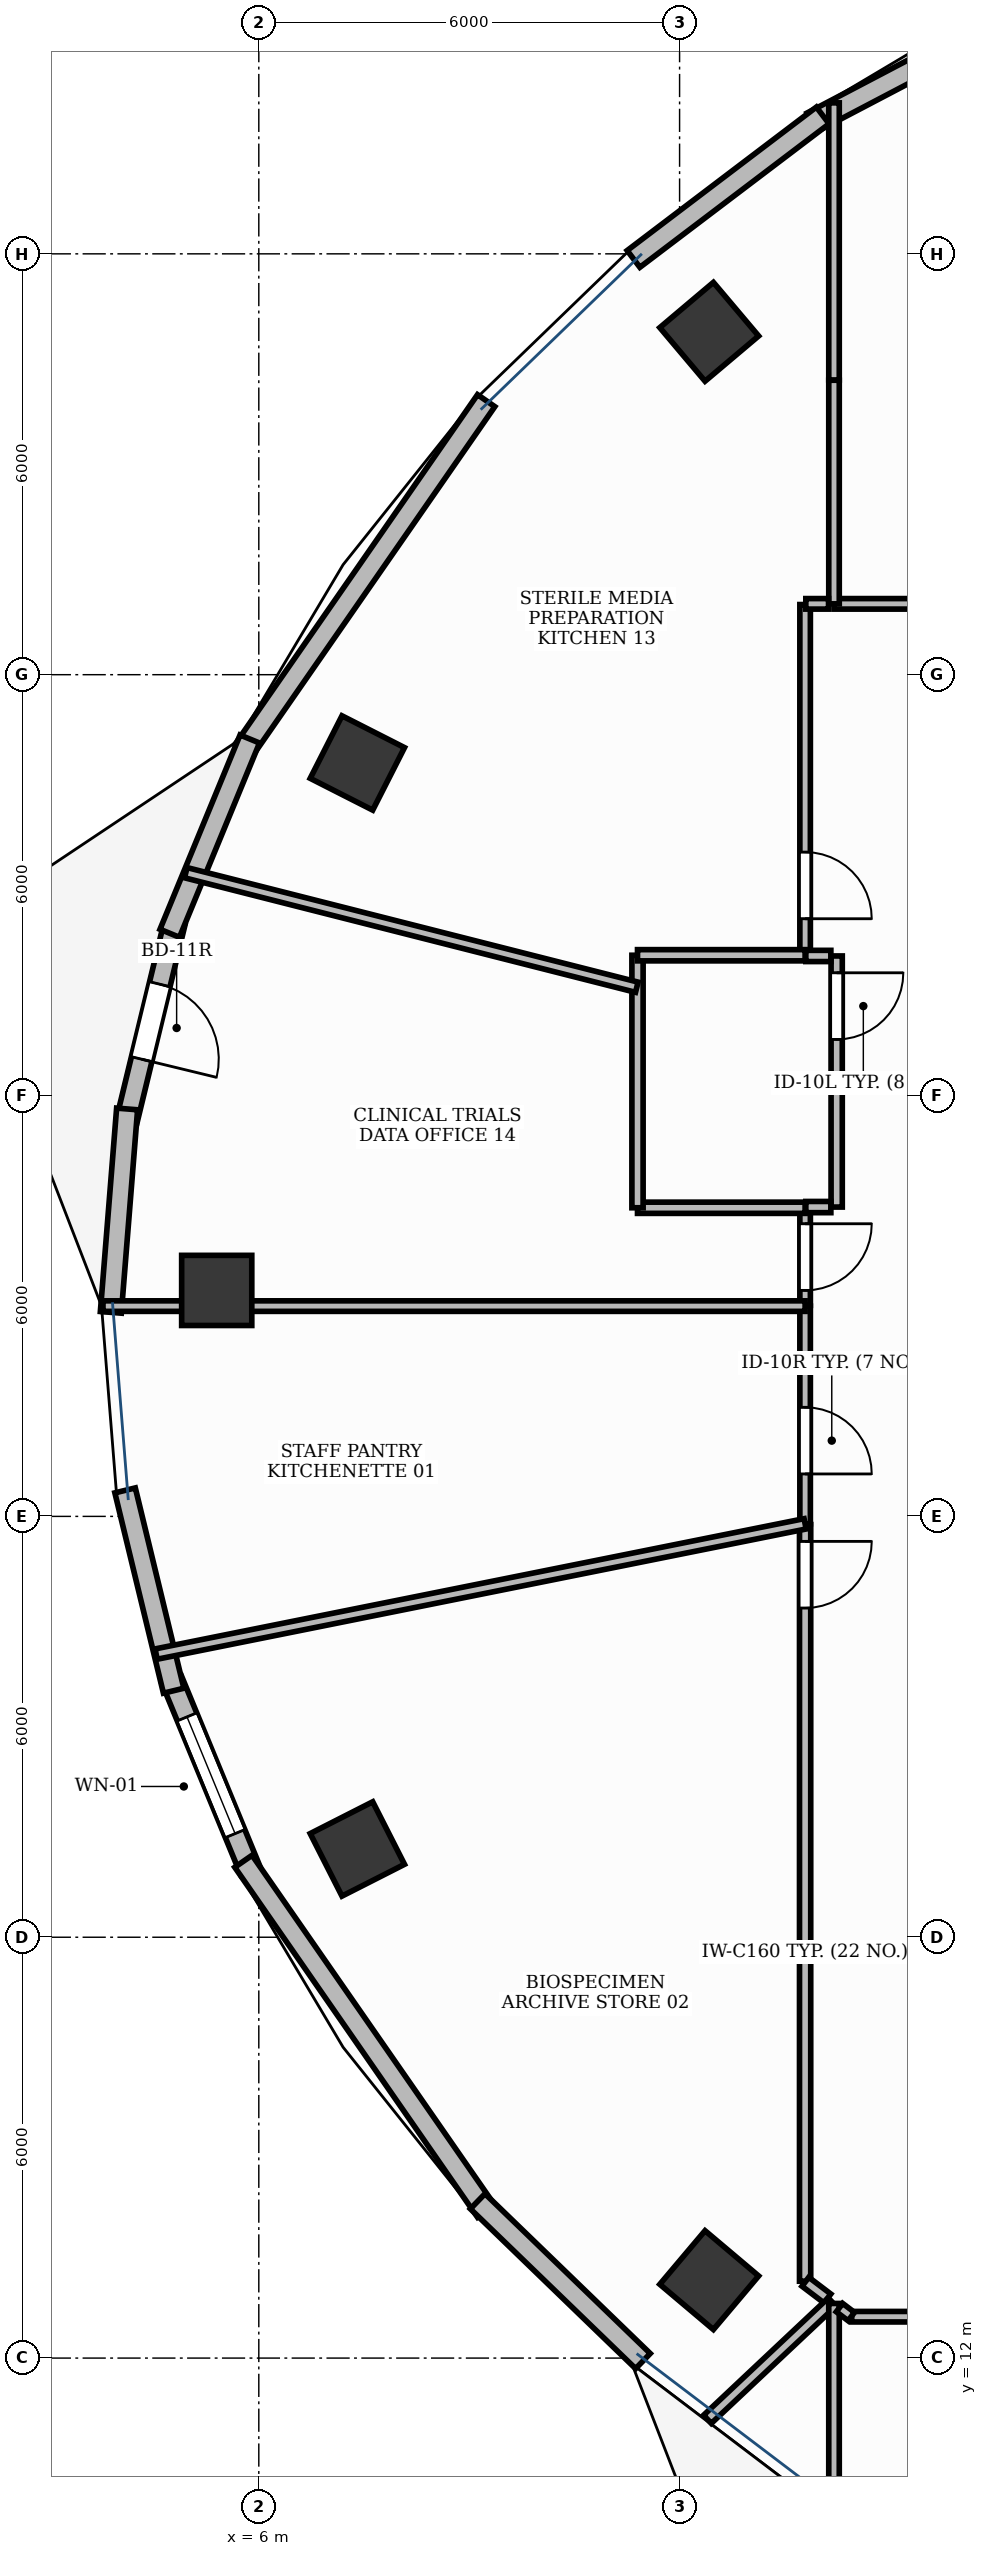
"""IFC4 building model, lengths in metres.
Left out: names, types, materials, properties, quantities, classifications, styles, units other than length and angle.
Written with IfcOpenShell. Run it as: python <this file> out.ifc"""

import sys

from ifc_helpers import new_model, si_unit, direction, frame, frame_2d, origin, origin_2d, place, context, subcontext, project, spatial, rectangle, extrude, element, fill, save


model = new_model("IFC4")
c1 = context("Model", 3, precision=1e-05, world=origin(), true_north=direction((0.0, 1.0)))
c2 = subcontext(c1, "Body", "Model", "MODEL_VIEW")
j1 = project(units=[si_unit("LENGTHUNIT", "METRE"), si_unit("PLANEANGLEUNIT", "RADIAN")], contexts=[c1])
p1 = place(None, origin())
s1 = spatial("IfcSite", under=j1, at=p1, CompositionType="ELEMENT")
p2 = place(p1, origin())
s2 = spatial("IfcBuilding", under=s1, at=p2, CompositionType="ELEMENT")
p3 = place(p2, frame((0.0, 0.0, 239.4)))
s3 = spatial("IfcBuildingStorey", under=s2, at=p3, CompositionType="ELEMENT", Elevation=239.4)
for number, where, z_axis, x_axis in (
    (1, (12.423, 40.889, -0.0), (0.0, 0.0, 1.0), (0.764, 0.645, 0.0)),
    (2, (7.405, 34.741, -0.0), (0.0, 0.0, 1.0), (0.453, 0.891, 0.0)),
    (3, (5.4, 27.222, -0.0), (0.0, 0.0, 1.0), (0.0, 1.0, 0.0)),
    (4, (7.405, 19.259, -0.0), (0.0, 0.0, 1.0), (-0.453, 0.891, 0.0)),
    (5, (12.423, 13.111, -0.0), (0.0, 0.0, 1.0), (-0.764, 0.645, 0.0)),
):
    element("IfcColumn", number, at=place(p3, frame(where, z_axis=z_axis, x_axis=x_axis)), inside=s3, PredefinedType="COLUMN", context=c2, shape_type="SweptSolid", body=[
        extrude(rectangle(XDim=1.0, YDim=1.0, at=origin_2d()), origin(), (0.0, 0.0, 1.0), 3.901),
    ])
p4 = place(p3, frame((4.8, 32.461, 0.0), z_axis=(0.0, 0.0, 1.0), x_axis=(-0.23549395731, -0.971875813091, 0.0)))
e6 = element("IfcWall", 6, at=p4, inside=s3, PredefinedType="STANDARD", context=c2, shape_type="SweptSolid", body=[
    extrude(rectangle(XDim=2.899, YDim=0.3, at=frame_2d((1.449, 0.0))), origin(), (0.0, 0.0, 1.0), 3.9),
])
p5 = place(p4, frame((0.899, 0.0, 0.0)))
e7 = element("IfcOpeningElement", 7, at=p5, cuts=e6, PredefinedType="OPENING", context=c2, shape_type="SweptSolid", body=[
    extrude(rectangle(XDim=1.1, YDim=2.15, at=frame_2d((0.55, 1.075))), frame((0.0, 0.165, 0.0), z_axis=(0.0, -1.0, 0.0), x_axis=(1.0, 0.0, 0.0)), (0.0, 0.0, 1.0), 0.33),
])
p6 = place(p3, frame((4.756, 21.676, 0.0), z_axis=(0.0, 0.0, 1.0), x_axis=(0.381011504275, -0.924570296738, 0.0)))
e8 = element("IfcWall", 8, at=p6, inside=s3, PredefinedType="STANDARD", context=c2, shape_type="SweptSolid", body=[
    extrude(rectangle(XDim=2.956, YDim=0.3, at=frame_2d((1.478, 0.0))), origin(), (0.0, 0.0, 1.0), 3.9),
])
p7 = place(p6, frame((0.578, 0.0, 0.9)))
e9 = element("IfcOpeningElement", 9, at=p7, cuts=e8, PredefinedType="OPENING", context=c2, shape_type="SweptSolid", body=[
    extrude(rectangle(XDim=1.8, YDim=2.1, at=frame_2d((0.9, 1.05))), frame((0.0, 0.165, 0.0), z_axis=(0.0, -1.0, 0.0), x_axis=(1.0, 0.0, 0.0)), (0.0, 0.0, 1.0), 0.33),
])
p8 = place(p3, frame((20.004, 47.084, 0.0), z_axis=(0.0, 0.0, 1.0), x_axis=(-0.885549132128, -0.464545729274, 0.0)))
e10 = element("IfcWall", 10, at=p8, inside=s3, PredefinedType="STANDARD", context=c2, shape_type="SweptSolid", body=[
    extrude(rectangle(XDim=6.908, YDim=0.3, at=frame_2d((3.454, 0.0))), origin(), (0.0, 0.0, 1.0), 3.9),
])
p9 = place(p3, frame((14.041, 43.973, 0.0), z_axis=(0.0, 0.0, 1.0), x_axis=(-0.796917512891, -0.604088137317, 0.0)))
e11 = element("IfcWall", 11, at=p9, inside=s3, PredefinedType="STANDARD", context=c2, shape_type="SweptSolid", body=[
    extrude(rectangle(XDim=3.385, YDim=0.3, at=frame_2d((1.693, 0.0))), origin(), (0.0, 0.0, 1.0), 3.9),
])
p10 = place(p3, frame((9.242, 39.907, 0.0), z_axis=(0.0, 0.0, 1.0), x_axis=(-0.569941426855, -0.821685322952, 0.0)))
e12 = element("IfcWall", 12, at=p10, inside=s3, PredefinedType="STANDARD", context=c2, shape_type="SweptSolid", body=[
    extrude(rectangle(XDim=6.073, YDim=0.3, at=frame_2d((3.036, 0.0))), origin(), (0.0, 0.0, 1.0), 3.9),
])
p11 = place(p3, frame((5.871, 35.083, 0.0), z_axis=(0.0, 0.0, 1.0), x_axis=(-0.380967021775, -0.924588626536, 0.0)))
e13 = element("IfcWall", 13, at=p11, inside=s3, PredefinedType="STANDARD", context=c2, shape_type="SweptSolid", body=[
    extrude(rectangle(XDim=2.996, YDim=0.3, at=frame_2d((1.498, 0.0))), origin(), (0.0, 0.0, 1.0), 3.9),
])
p12 = place(p3, frame((4.122, 29.809, 0.0), z_axis=(0.0, 0.0, 1.0), x_axis=(-0.079738550157, -0.996815812284, 0.0)))
e14 = element("IfcWall", 14, at=p12, inside=s3, PredefinedType="STANDARD", context=c2, shape_type="SweptSolid", body=[
    extrude(rectangle(XDim=2.909, YDim=0.3, at=frame_2d((1.454, 0.0))), origin(), (0.0, 0.0, 1.0), 3.9),
])
p13 = place(p3, frame((4.094, 24.371, 0.0), z_axis=(0.0, 0.0, 1.0), x_axis=(0.235531068122, -0.971866820068, 0.0)))
e15 = element("IfcWall", 15, at=p13, inside=s3, PredefinedType="STANDARD", context=c2, shape_type="SweptSolid", body=[
    extrude(rectangle(XDim=2.939, YDim=0.3, at=frame_2d((1.469, 0.0))), origin(), (0.0, 0.0, 1.0), 3.9),
])
p14 = place(p3, frame((5.781, 19.083, 0.0), z_axis=(0.0, 0.0, 1.0), x_axis=(0.569941426855, -0.821685322952, 0.0)))
e16 = element("IfcWall", 16, at=p14, inside=s3, PredefinedType="STANDARD", context=c2, shape_type="SweptSolid", body=[
    extrude(rectangle(XDim=6.073, YDim=0.3, at=frame_2d((3.036, 0.0))), origin(), (0.0, 0.0, 1.0), 3.9),
])
p15 = place(p3, frame((9.121, 14.235, 0.0), z_axis=(0.0, 0.0, 1.0), x_axis=(0.718999544538, -0.695010543052, 0.0)))
e17 = element("IfcWall", 17, at=p15, inside=s3, PredefinedType="STANDARD", context=c2, shape_type="SweptSolid", body=[
    extrude(rectangle(XDim=3.277, YDim=0.3, at=frame_2d((1.639, 0.0))), origin(), (0.0, 0.0, 1.0), 3.9),
])
p16 = place(p3, frame((14.24, 31.99, 0.0), z_axis=(0.0, 0.0, 1.0), x_axis=(0.0, -1.0, 0.0)))
e18 = element("IfcWall", 18, at=p16, inside=s3, PredefinedType="PARTITIONING", context=c2, shape_type="SweptSolid", body=[
    extrude(rectangle(XDim=3.58, YDim=0.16, at=frame_2d((1.79, 0.0))), origin(), (0.0, 0.0, 1.0), 2.22),
])
p17 = place(p16, frame((0.24, 0.0, 0.0)))
e19 = element("IfcOpeningElement", 19, at=p17, cuts=e18, PredefinedType="OPENING", context=c2, shape_type="SweptSolid", body=[
    extrude(rectangle(XDim=0.95, YDim=2.15, at=frame_2d((0.475, 1.075))), frame((0.0, 0.095, 0.0), z_axis=(0.0, -1.0, 0.0), x_axis=(1.0, 0.0, 0.0)), (0.0, 0.0, 1.0), 0.19),
])
p18 = place(p3, frame((13.79, 26.998, 0.0), z_axis=(0.0, 0.0, 1.0), x_axis=(0.0, -1.0, 0.0)))
e20 = element("IfcWall", 20, at=p18, inside=s3, PredefinedType="PARTITIONING", context=c2, shape_type="SweptSolid", body=[
    extrude(rectangle(XDim=3.104, YDim=0.15, at=frame_2d((1.552, 0.0))), origin(), (0.0, 0.0, 1.0), 2.22),
])
p19 = place(p18, frame((1.443, 0.0, 0.0)))
e21 = element("IfcOpeningElement", 21, at=p19, cuts=e20, PredefinedType="OPENING", context=c2, shape_type="SweptSolid", body=[
    extrude(rectangle(XDim=0.95, YDim=2.15, at=frame_2d((0.475, 1.075))), frame((0.0, 0.09, 0.0), z_axis=(0.0, -1.0, 0.0), x_axis=(1.0, 0.0, 0.0)), (0.0, 0.0, 1.0), 0.18),
])
p20 = place(p3, frame((13.79, 23.884, 0.0), z_axis=(0.0, 0.0, 1.0), x_axis=(0.0, -1.0, 0.0)))
e22 = element("IfcWall", 22, at=p20, inside=s3, PredefinedType="PARTITIONING", context=c2, shape_type="SweptSolid", body=[
    extrude(rectangle(XDim=10.787, YDim=0.16, at=frame_2d((5.394, 0.0))), origin(), (0.0, 0.0, 1.0), 2.22),
])
p21 = place(p20, frame((0.24, 0.0, 0.0)))
e23 = element("IfcOpeningElement", 23, at=p21, cuts=e22, PredefinedType="OPENING", context=c2, shape_type="SweptSolid", body=[
    extrude(rectangle(XDim=0.95, YDim=2.15, at=frame_2d((0.475, 1.075))), frame((0.0, 0.095, 0.0), z_axis=(0.0, -1.0, 0.0), x_axis=(1.0, 0.0, 0.0)), (0.0, 0.0, 1.0), 0.19),
])
p22 = place(p3, frame((14.454, 12.59, 0.0), z_axis=(0.0, 0.0, 1.0), x_axis=(1.0, 0.0, 0.0)))
e24 = element("IfcWall", 24, at=p22, inside=s3, PredefinedType="PARTITIONING", context=c2, shape_type="SweptSolid", body=[
    extrude(rectangle(XDim=12.652, YDim=0.15, at=frame_2d((6.326, 0.0))), origin(), (0.0, 0.0, 1.0), 2.22),
])
p23 = place(p22, frame((1.673, 0.0, 0.0)))
e25 = element("IfcOpeningElement", 25, at=p23, cuts=e24, PredefinedType="OPENING", context=c2, shape_type="SweptSolid", body=[
    extrude(rectangle(XDim=0.95, YDim=2.15, at=frame_2d((0.475, 1.075))), frame((0.0, 0.09, 0.0), z_axis=(0.0, -1.0, 0.0), x_axis=(1.0, 0.0, 0.0)), (0.0, 0.0, 1.0), 0.18),
])
p24 = place(p3, frame((13.79, 37.0, 0.0), z_axis=(0.0, 0.0, 1.0), x_axis=(0.0, -1.0, 0.0)))
e26 = element("IfcWall", 26, at=p24, inside=s3, PredefinedType="PARTITIONING", context=c2, shape_type="SweptSolid", body=[
    extrude(rectangle(XDim=4.99, YDim=0.15, at=frame_2d((2.495, 0.0))), origin(), (0.0, 0.0, 1.0), 2.22),
])
p25 = place(p24, frame((3.529, 0.0, 0.0)))
e27 = element("IfcOpeningElement", 27, at=p25, cuts=e26, PredefinedType="OPENING", context=c2, shape_type="SweptSolid", body=[
    extrude(rectangle(XDim=0.95, YDim=2.15, at=frame_2d((0.475, 1.075))), frame((0.0, 0.09, 0.0), z_axis=(0.0, -1.0, 0.0), x_axis=(1.0, 0.0, 0.0)), (0.0, 0.0, 1.0), 0.18),
])
p26 = place(p3, frame((13.79, 28.39, 0.0), z_axis=(0.0, 0.0, 1.0), x_axis=(0.0, -1.0, 0.0)))
e28 = element("IfcWall", 28, at=p26, inside=s3, PredefinedType="PARTITIONING", context=c2, shape_type="SweptSolid", body=[
    extrude(rectangle(XDim=1.382, YDim=0.15, at=frame_2d((0.691, 0.0))), origin(), (0.0, 0.0, 1.0), 2.22),
])
p27 = place(p26, frame((0.218, 0.0, 0.0)))
e29 = element("IfcOpeningElement", 29, at=p27, cuts=e28, PredefinedType="OPENING", context=c2, shape_type="SweptSolid", body=[
    extrude(rectangle(XDim=0.95, YDim=2.15, at=frame_2d((0.475, 1.075))), frame((0.0, 0.09, 0.0), z_axis=(0.0, -1.0, 0.0), x_axis=(1.0, 0.0, 0.0)), (0.0, 0.0, 1.0), 0.18),
])
for number, where, z_axis, x_axis in (
    (30, (13.8, 31.99, 0.0), (0.0, 0.0, 1.0), (1.0, 0.0, 0.0)),
    (31, (14.157, 28.41, 0.0), (0.0, 0.0, 1.0), (-1.0, 0.0, 0.0)),
):
    element("IfcWall", number, at=place(p3, frame(where, z_axis=z_axis, x_axis=x_axis)), inside=s3, PredefinedType="PARTITIONING", context=c2, shape_type="SweptSolid", body=[
        extrude(rectangle(XDim=0.357, YDim=0.16, at=frame_2d((0.178, 0.0))), origin(), (0.0, 0.0, 1.0), 2.22),
    ])
p28 = place(p3, frame((13.79, 28.4, 0.0), z_axis=(0.0, 0.0, 1.0), x_axis=(-1.0, 0.0, 0.0)))
e32 = element("IfcWall", 32, at=p28, inside=s3, PredefinedType="PARTITIONING", context=c2, shape_type="SweptSolid", body=[
    extrude(rectangle(XDim=2.39, YDim=0.16, at=frame_2d((1.195, 0.0))), origin(), (0.0, 0.0, 1.0), 2.22),
])
p29 = place(p3, frame((11.4, 28.4, 0.0), z_axis=(0.0, 0.0, 1.0), x_axis=(0.0, 1.0, 0.0)))
e33 = element("IfcWall", 33, at=p29, inside=s3, PredefinedType="PARTITIONING", context=c2, shape_type="SweptSolid", body=[
    extrude(rectangle(XDim=3.6, YDim=0.16, at=frame_2d((1.8, 0.0))), origin(), (0.0, 0.0, 1.0), 2.22),
])
p30 = place(p3, frame((11.4, 32.0, 0.0), z_axis=(0.0, 0.0, 1.0), x_axis=(1.0, 0.0, 0.0)))
e34 = element("IfcWall", 34, at=p30, inside=s3, PredefinedType="PARTITIONING", context=c2, shape_type="SweptSolid", body=[
    extrude(rectangle(XDim=2.39, YDim=0.16, at=frame_2d((1.195, 0.0))), origin(), (0.0, 0.0, 1.0), 2.22),
])
p31 = place(p3, frame((3.778, 26.998, 0.0), z_axis=(0.0, 0.0, 1.0), x_axis=(1.0, 0.0, 0.0)))
e35 = element("IfcWall", 35, at=p31, inside=s3, PredefinedType="PARTITIONING", context=c2, shape_type="SweptSolid", body=[
    extrude(rectangle(XDim=10.012, YDim=0.15, at=frame_2d((5.006, 0.0))), origin(), (0.0, 0.0, 1.0), 2.22),
])
p32 = place(p3, frame((13.79, 23.894, 0.0), z_axis=(0.0, 0.0, 1.0), x_axis=(-0.980456122103, -0.196737877977, 0.0)))
e36 = element("IfcWall", 36, at=p32, inside=s3, PredefinedType="PARTITIONING", context=c2, shape_type="SweptSolid", body=[
    extrude(rectangle(XDim=9.439, YDim=0.15, at=frame_2d((4.719, 0.0))), origin(), (0.0, 0.0, 1.0), 2.22),
])
p33 = place(p3, frame((13.794, 13.088, 0.0), z_axis=(0.0, 0.0, 1.0), x_axis=(0.797092148154, -0.603857687995, 0.0)))
e37 = element("IfcWall", 37, at=p33, inside=s3, PredefinedType="PARTITIONING", context=c2, shape_type="SweptSolid", body=[
    extrude(rectangle(XDim=0.394, YDim=0.16, at=frame_2d((0.197, 0.0))), origin(), (0.0, 0.0, 1.0), 2.22),
])
p34 = place(p3, frame((14.175, 12.799, 0.0), z_axis=(0.0, 0.0, 1.0), x_axis=(-0.728528819482, -0.685015152521, 0.0)))
e38 = element("IfcWall", 38, at=p34, inside=s3, PredefinedType="PARTITIONING", context=c2, shape_type="SweptSolid", body=[
    extrude(rectangle(XDim=2.441, YDim=0.16, at=frame_2d((1.22, 0.0))), origin(), (0.0, 0.0, 1.0), 2.22),
])
p35 = place(p3, frame((14.202, 9.847, 0.0), z_axis=(0.0, 0.0, 1.0), x_axis=(0.0, 1.0, 0.0)))
e39 = element("IfcWall", 39, at=p35, inside=s3, PredefinedType="PARTITIONING", context=c2, shape_type="SweptSolid", body=[
    extrude(rectangle(XDim=2.931, YDim=0.15, at=frame_2d((1.466, 0.0))), origin(), (0.0, 0.0, 1.0), 2.22),
])
p36 = place(p3, frame((14.28, 12.72, 0.0), z_axis=(0.0, 0.0, 1.0), x_axis=(0.796940505815, -0.604057803683, 0.0)))
e40 = element("IfcWall", 40, at=p36, inside=s3, PredefinedType="PARTITIONING", context=c2, shape_type="SweptSolid", body=[
    extrude(rectangle(XDim=0.211, YDim=0.15, at=frame_2d((0.106, 0.0))), origin(), (0.0, 0.0, 1.0), 2.22),
])
p37 = place(p3, frame((17.6, 37.01, 0.0), z_axis=(0.0, 0.0, 1.0), x_axis=(-1.0, 0.0, 0.0)))
e41 = element("IfcWall", 41, at=p37, inside=s3, PredefinedType="PARTITIONING", context=c2, shape_type="SweptSolid", body=[
    extrude(rectangle(XDim=3.398, YDim=0.15, at=frame_2d((1.699, 0.0))), origin(), (0.0, 0.0, 1.0), 2.22),
])
p38 = place(p3, frame((14.202, 37.01, 0.0), z_axis=(0.0, 0.0, 1.0), x_axis=(0.0, 1.0, 0.0)))
e42 = element("IfcWall", 42, at=p38, inside=s3, PredefinedType="PARTITIONING", context=c2, shape_type="SweptSolid", body=[
    extrude(rectangle(XDim=3.188, YDim=0.15, at=frame_2d((1.594, 0.0))), origin(), (0.0, 0.0, 1.0), 2.22),
])
p39 = place(p3, frame((14.202, 40.202, 0.0), z_axis=(0.0, 0.0, 1.0), x_axis=(0.0, 1.0, 0.0)))
e43 = element("IfcWall", 43, at=p39, inside=s3, PredefinedType="PARTITIONING", context=c2, shape_type="SweptSolid", body=[
    extrude(rectangle(XDim=3.95, YDim=0.15, at=frame_2d((1.975, 0.0))), origin(), (0.0, 0.0, 1.0), 2.22),
])
p40 = place(p3, frame((14.124, 37.01, 0.0), z_axis=(0.0, 0.0, 1.0), x_axis=(-1.0, 0.0, 0.0)))
e44 = element("IfcWall", 44, at=p40, inside=s3, PredefinedType="PARTITIONING", context=c2, shape_type="SweptSolid", body=[
    extrude(rectangle(XDim=0.324, YDim=0.15, at=frame_2d((0.162, 0.0))), origin(), (0.0, 0.0, 1.0), 2.22),
])
p41 = place(p3, frame((11.39, 31.544, 0.0), z_axis=(0.0, 0.0, 1.0), x_axis=(-0.969246374059, 0.246092393976, 0.0)))
e45 = element("IfcWall", 45, at=p41, inside=s3, PredefinedType="PARTITIONING", context=c2, shape_type="SweptSolid", body=[
    extrude(rectangle(XDim=6.635, YDim=0.15, at=frame_2d((3.317, 0.0))), origin(), (0.0, 0.0, 1.0), 2.22),
])
p42 = place(p5, origin())
e46 = element("IfcDoor", 46, at=p42, inside=s3, OperationType="SINGLE_SWING_RIGHT", PredefinedType="DOOR", context=c2, shape_type="SweptSolid", body=[
    extrude(rectangle(XDim=1.1, YDim=2.15, at=frame_2d((0.55, 1.075))), frame((0.0, 0.025, 0.0), z_axis=(0.0, -1.0, 0.0), x_axis=(1.0, 0.0, 0.0)), (0.0, 0.0, 1.0), 0.05),
])
fill(e7, e46)
p43 = place(p7, origin())
e47 = element("IfcWindow", 47, at=p43, inside=s3, PartitioningType="SINGLE_PANEL", PredefinedType="WINDOW", context=c2, shape_type="SweptSolid", body=[
    extrude(rectangle(XDim=1.8, YDim=2.1, at=frame_2d((0.9, 1.05))), frame((0.0, 0.03, 0.0), z_axis=(0.0, -1.0, 0.0), x_axis=(1.0, 0.0, 0.0)), (0.0, 0.0, 1.0), 0.06),
])
fill(e9, e47)
p44 = place(p17, origin())
e48 = element("IfcDoor", 48, at=p44, inside=s3, OperationType="SINGLE_SWING_LEFT", PredefinedType="DOOR", context=c2, shape_type="SweptSolid", body=[
    extrude(rectangle(XDim=0.95, YDim=2.15, at=frame_2d((0.475, 1.075))), frame((0.0, 0.025, 0.0), z_axis=(0.0, -1.0, 0.0), x_axis=(1.0, 0.0, 0.0)), (0.0, 0.0, 1.0), 0.05),
])
fill(e19, e48)
p45 = place(p19, origin())
e49 = element("IfcDoor", 49, at=p45, inside=s3, OperationType="SINGLE_SWING_RIGHT", PredefinedType="DOOR", context=c2, shape_type="SweptSolid", body=[
    extrude(rectangle(XDim=0.95, YDim=2.15, at=frame_2d((0.475, 1.075))), frame((0.0, 0.025, 0.0), z_axis=(0.0, -1.0, 0.0), x_axis=(1.0, 0.0, 0.0)), (0.0, 0.0, 1.0), 0.05),
])
fill(e21, e49)
p46 = place(p21, origin())
e50 = element("IfcDoor", 50, at=p46, inside=s3, OperationType="SINGLE_SWING_LEFT", PredefinedType="DOOR", context=c2, shape_type="SweptSolid", body=[
    extrude(rectangle(XDim=0.95, YDim=2.15, at=frame_2d((0.475, 1.075))), frame((0.0, 0.025, 0.0), z_axis=(0.0, -1.0, 0.0), x_axis=(1.0, 0.0, 0.0)), (0.0, 0.0, 1.0), 0.05),
])
fill(e23, e50)
p47 = place(p25, origin())
e51 = element("IfcDoor", 51, at=p47, inside=s3, OperationType="SINGLE_SWING_RIGHT", PredefinedType="DOOR", context=c2, shape_type="SweptSolid", body=[
    extrude(rectangle(XDim=0.95, YDim=2.15, at=frame_2d((0.475, 1.075))), frame((0.0, 0.025, 0.0), z_axis=(0.0, -1.0, 0.0), x_axis=(1.0, 0.0, 0.0)), (0.0, 0.0, 1.0), 0.05),
])
fill(e27, e51)
p48 = place(p27, origin())
e52 = element("IfcDoor", 52, at=p48, inside=s3, OperationType="SINGLE_SWING_LEFT", PredefinedType="DOOR", context=c2, shape_type="SweptSolid", body=[
    extrude(rectangle(XDim=0.95, YDim=2.15, at=frame_2d((0.475, 1.075))), frame((0.0, 0.025, 0.0), z_axis=(0.0, -1.0, 0.0), x_axis=(1.0, 0.0, 0.0)), (0.0, 0.0, 1.0), 0.05),
])
fill(e29, e52)
save(model, sys.argv[1])
